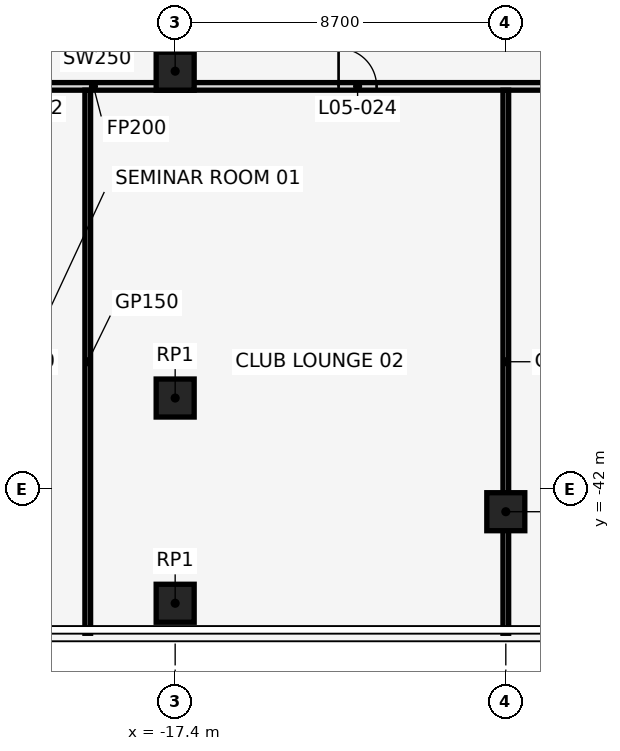
"""IFC4 building model, lengths in metres.
Left out: names, types, materials, properties, quantities, classifications, styles, units other than length and angle.
Written with IfcOpenShell. Run it as: python <this file> out.ifc"""

import sys

from ifc_helpers import new_model, si_unit, direction, frame, frame_2d, origin, origin_2d, place, context, subcontext, project, spatial, rectangle, extrude, element, fill, save


model = new_model("IFC4")
c1 = context("Model", 3, precision=1e-05, world=origin(), true_north=direction((0.0, 1.0)))
c2 = subcontext(c1, "Body", "Model", "MODEL_VIEW")
j1 = project(units=[si_unit("LENGTHUNIT", "METRE"), si_unit("PLANEANGLEUNIT", "RADIAN")], contexts=[c1])
p1 = place(None, origin())
s1 = spatial("IfcSite", under=j1, at=p1, CompositionType="ELEMENT")
p2 = place(p1, origin())
s2 = spatial("IfcBuilding", under=s1, at=p2, CompositionType="ELEMENT")
p3 = place(p2, frame((0.0, 0.0, 30.0)))
s3 = spatial("IfcBuildingStorey", under=s2, at=p3, CompositionType="ELEMENT", Elevation=30.0)
for number, where, z_axis, x_axis in (
    (1, (-17.4, -39.6, 0.0), (0.0, 0.0, 1.0), (1.0, 0.0, 0.0)),
    (2, (-8.7, -42.591, 0.0), (0.0, 0.0, 1.0), (1.0, 0.0, 0.0)),
    (3, (-17.4, -31.0, 0.0), (0.0, 0.0, 1.0), (1.0, 0.0, 0.0)),
    (4, (-17.4, -45.0, 0.0), (0.0, 0.0, 1.0), (1.0, 0.0, 0.0)),
):
    element("IfcColumn", number, at=place(p3, frame(where, z_axis=z_axis, x_axis=x_axis)), inside=s3, PredefinedType="COLUMN", context=c2, shape_type="SweptSolid", body=[
        extrude(rectangle(XDim=1.0, YDim=1.0, at=origin_2d()), origin(), (0.0, 0.0, 1.0), 5.0),
    ])
p4 = place(p3, frame((-42.0, -31.4, 0.0), z_axis=(0.0, 0.0, 1.0), x_axis=(1.0, 0.0, 0.0)))
e5 = element("IfcWall", 5, at=p4, inside=s3, PredefinedType="PARTITIONING", context=c2, shape_type="SweptSolid", body=[
    extrude(rectangle(XDim=44.9, YDim=0.2, at=frame_2d((22.45, 0.0))), origin(), (0.0, 0.0, 1.0), 3.74),
])
p5 = place(p4, frame((1.5, 0.0, 0.0)))
e6 = element("IfcOpeningElement", 6, at=p5, cuts=e5, PredefinedType="OPENING", context=c2, shape_type="SweptSolid", body=[
    extrude(rectangle(XDim=1.0, YDim=2.1, at=frame_2d((0.5, 1.05))), frame((0.0, 0.112, 0.0), z_axis=(0.0, -1.0, 0.0), x_axis=(1.0, 0.0, 0.0)), (0.0, 0.0, 1.0), 0.224),
])
p6 = place(p4, frame((8.5, 0.0, 0.0)))
e7 = element("IfcOpeningElement", 7, at=p6, cuts=e5, PredefinedType="OPENING", context=c2, shape_type="SweptSolid", body=[
    extrude(rectangle(XDim=1.0, YDim=2.1, at=frame_2d((0.5, 1.05))), frame((0.0, 0.112, 0.0), z_axis=(0.0, -1.0, 0.0), x_axis=(1.0, 0.0, 0.0)), (0.0, 0.0, 1.0), 0.224),
])
p7 = place(p4, frame((17.2, 0.0, 0.0)))
e8 = element("IfcOpeningElement", 8, at=p7, cuts=e5, PredefinedType="OPENING", context=c2, shape_type="SweptSolid", body=[
    extrude(rectangle(XDim=1.0, YDim=2.1, at=frame_2d((0.5, 1.05))), frame((0.0, 0.112, 0.0), z_axis=(0.0, -1.0, 0.0), x_axis=(1.0, 0.0, 0.0)), (0.0, 0.0, 1.0), 0.224),
])
p8 = place(p4, frame((20.1, 0.0, 0.0)))
e9 = element("IfcOpeningElement", 9, at=p8, cuts=e5, PredefinedType="OPENING", context=c2, shape_type="SweptSolid", body=[
    extrude(rectangle(XDim=1.0, YDim=2.1, at=frame_2d((0.5, 1.05))), frame((0.0, 0.112, 0.0), z_axis=(0.0, -1.0, 0.0), x_axis=(1.0, 0.0, 0.0)), (0.0, 0.0, 1.0), 0.224),
])
p9 = place(p4, frame((28.9, 0.0, 0.0)))
e10 = element("IfcOpeningElement", 10, at=p9, cuts=e5, PredefinedType="OPENING", context=c2, shape_type="SweptSolid", body=[
    extrude(rectangle(XDim=1.0, YDim=2.1, at=frame_2d((0.5, 1.05))), frame((0.0, 0.112, 0.0), z_axis=(0.0, -1.0, 0.0), x_axis=(1.0, 0.0, 0.0)), (0.0, 0.0, 1.0), 0.224),
])
p10 = place(p4, frame((38.6, 0.0, 0.0)))
e11 = element("IfcOpeningElement", 11, at=p10, cuts=e5, PredefinedType="OPENING", context=c2, shape_type="SweptSolid", body=[
    extrude(rectangle(XDim=1.0, YDim=2.1, at=frame_2d((0.5, 1.05))), frame((0.0, 0.112, 0.0), z_axis=(0.0, -1.0, 0.0), x_axis=(1.0, 0.0, 0.0)), (0.0, 0.0, 1.0), 0.224),
])
for number, where, z_axis, x_axis in (
    (12, (-19.7, -45.79, 0.0), (0.0, 0.0, 1.0), (0.0, 1.0, 0.0)),
    (13, (-8.7, -45.79, 0.0), (0.0, 0.0, 1.0), (0.0, 1.0, 0.0)),
):
    element("IfcWall", number, at=place(p3, frame(where, z_axis=z_axis, x_axis=x_axis)), inside=s3, PredefinedType="PARTITIONING", context=c2, shape_type="SweptSolid", body=[
        extrude(rectangle(XDim=14.29, YDim=0.15, at=frame_2d((7.145, 0.0))), origin(), (0.0, 0.0, 1.0), 3.74),
    ])
p11 = place(p9, frame((1.0, 0.0, 0.0), z_axis=(0.0, 0.0, 1.0), x_axis=(-1.0, 0.0, 0.0)))
e14 = element("IfcDoor", 14, at=p11, inside=s3, OperationType="SINGLE_SWING_RIGHT", PredefinedType="DOOR", context=c2, shape_type="SweptSolid", body=[
    extrude(rectangle(XDim=1.0, YDim=2.1, at=frame_2d((0.5, 1.05))), frame((0.0, 0.025, 0.0), z_axis=(0.0, -1.0, 0.0), x_axis=(1.0, 0.0, 0.0)), (0.0, 0.0, 1.0), 0.05),
])
fill(e10, e14)
save(model, sys.argv[1])
